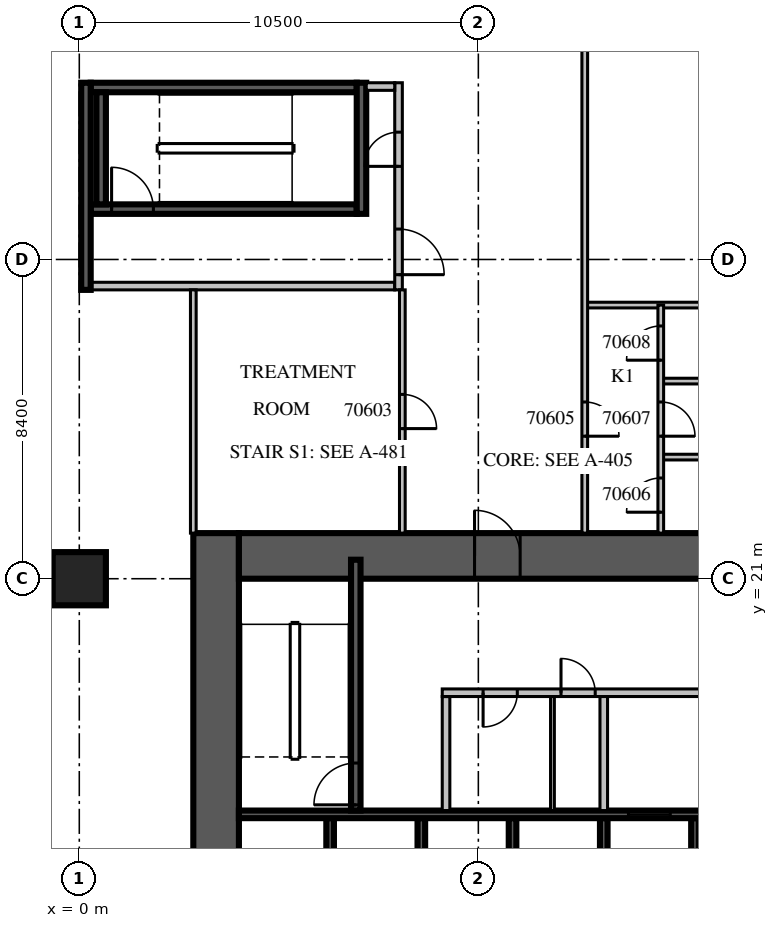
"""IFC4 building model, lengths in metres.
Left out: names, types, materials, properties, quantities, classifications, styles, units other than length and angle.
Written with IfcOpenShell. Run it as: python <this file> out.ifc"""

import sys

from ifc_helpers import new_model, si_unit, direction, frame, frame_2d, origin, origin_2d, place, context, subcontext, project, spatial, rectangle, extrude, source, transform, mapped, element, fill, save


model = new_model("IFC4")
c1 = context("Model", 3, precision=1e-05, world=origin(), true_north=direction((0.0, 1.0)))
c2 = subcontext(c1, "Body", "Model", "MODEL_VIEW")
j1 = project(units=[si_unit("LENGTHUNIT", "METRE"), si_unit("PLANEANGLEUNIT", "RADIAN")], contexts=[c1])
p1 = place(None, origin())
s1 = spatial("IfcSite", under=j1, at=p1, CompositionType="ELEMENT")
p2 = place(p1, origin())
s2 = spatial("IfcBuilding", under=s1, at=p2, CompositionType="ELEMENT")
p3 = place(p2, frame((0.0, 0.0, 18.3)))
s3 = spatial("IfcBuildingStorey", under=s2, at=p3, CompositionType="ELEMENT", Elevation=18.3)
m1 = source(origin(), c2, "Body", "SweptSolid", [
    extrude(rectangle(XDim=1.4, YDim=1.4, at=origin_2d()), origin(), (0.0, 0.0, 1.0), 5.4),
])
p4 = place(p3, frame((0.0, 21.0, 0.0), z_axis=(0.0, 0.0, 1.0), x_axis=(1.0, 0.0, 0.0)))
e1 = element("IfcColumn", 1, at=p4, inside=s3, PredefinedType="COLUMN", context=c2, shape_type="MappedRepresentation", body=[
    mapped(m1, transform((0.0, 0.0, 0.0), scale=1.0)),
])
m2 = source(origin(), c2, "Body", "SweptSolid", [
    extrude(rectangle(XDim=18.0, YDim=1.2, at=frame_2d((9.0, 0.0))), origin(), (0.0, 0.0, 1.0), 5.4),
])
p5 = place(p3, frame((3.6, 4.2, 0.0), z_axis=(0.0, 0.0, 1.0), x_axis=(0.0, 1.0, 0.0)))
e2 = element("IfcWall", 2, at=p5, inside=s3, PredefinedType="SHEAR", context=c2, shape_type="MappedRepresentation", body=[
    mapped(m2, transform((0.0, 0.0, 0.0), scale=1.0)),
])
m3 = source(origin(), c2, "Body", "SweptSolid", [
    extrude(rectangle(XDim=2.2, YDim=2.1, at=frame_2d((1.1, 1.05))), frame((0.0, 0.61, 0.0), z_axis=(0.0, -1.0, 0.0), x_axis=(1.0, 0.0, 0.0)), (0.0, 0.0, 1.0), 1.22),
])
p6 = place(p5, frame((4.6, 0.0, 0.0)))
e3 = element("IfcOpeningElement", 3, at=p6, cuts=e2, PredefinedType="OPENING", context=c2, shape_type="MappedRepresentation", body=[
    mapped(m3, transform((0.0, 0.0, 0.0), scale=1.0)),
])
m4 = source(origin(), c2, "Body", "SweptSolid", [
    extrude(rectangle(XDim=16.8, YDim=1.2, at=frame_2d((8.4, 0.0))), origin(), (0.0, 0.0, 1.0), 5.4),
])
p7 = place(p3, frame((4.2, 21.6, 0.0), z_axis=(0.0, 0.0, 1.0), x_axis=(1.0, 0.0, 0.0)))
e4 = element("IfcWall", 4, at=p7, inside=s3, PredefinedType="SHEAR", context=c2, shape_type="MappedRepresentation", body=[
    mapped(m4, transform((0.0, 0.0, 0.0), scale=1.0)),
])
m5 = source(origin(), c2, "Body", "SweptSolid", [
    extrude(rectangle(XDim=1.2, YDim=2.1, at=frame_2d((0.6, 1.05))), frame((0.0, 0.61, 0.0), z_axis=(0.0, -1.0, 0.0), x_axis=(1.0, 0.0, 0.0)), (0.0, 0.0, 1.0), 1.22),
])
p8 = place(p7, frame((6.2, 0.0, 0.0)))
e5 = element("IfcOpeningElement", 5, at=p8, cuts=e4, PredefinedType="OPENING", context=c2, shape_type="MappedRepresentation", body=[
    mapped(m5, transform((0.0, 0.0, 0.0), scale=1.0)),
])
m6 = source(origin(), c2, "Body", "SweptSolid", [
    extrude(rectangle(XDim=3.0, YDim=0.2, at=frame_2d((1.5, 0.0))), origin(), (0.0, 0.0, 1.0), 5.4),
])
for number, where, z_axis, x_axis in (
    (6, (6.6, 11.7, 0.0), (0.0, 0.0, 1.0), (0.0, 1.0, 0.0)),
    (7, (9.0, 11.7, 0.0), (0.0, 0.0, 1.0), (0.0, 1.0, 0.0)),
    (8, (11.4, 11.7, 0.0), (0.0, 0.0, 1.0), (0.0, 1.0, 0.0)),
    (9, (13.8, 11.7, 0.0), (0.0, 0.0, 1.0), (0.0, 1.0, 0.0)),
    (10, (16.2, 11.7, 0.0), (0.0, 0.0, 1.0), (0.0, 1.0, 0.0)),
):
    element("IfcWall", number, at=place(p3, frame(where, z_axis=z_axis, x_axis=x_axis)), inside=s3, PredefinedType="SOLIDWALL", context=c2, shape_type="MappedRepresentation", body=[
        mapped(m6, transform((0.0, 0.0, 0.0), scale=1.0)),
    ])
m7 = source(origin(), c2, "Body", "SweptSolid", [
    extrude(rectangle(XDim=16.8, YDim=0.2, at=frame_2d((8.4, 0.0))), origin(), (0.0, 0.0, 1.0), 5.4),
])
p9 = place(p3, frame((4.2, 14.8, 0.0), z_axis=(0.0, 0.0, 1.0), x_axis=(1.0, 0.0, 0.0)))
e11 = element("IfcWall", 11, at=p9, inside=s3, PredefinedType="SOLIDWALL", context=c2, shape_type="MappedRepresentation", body=[
    mapped(m7, transform((0.0, 0.0, 0.0), scale=1.0)),
])
m8 = source(origin(), c2, "Body", "SweptSolid", [
    extrude(rectangle(XDim=1.1, YDim=2.1, at=frame_2d((0.55, 1.05))), frame((0.0, 0.11, 0.0), z_axis=(0.0, -1.0, 0.0), x_axis=(1.0, 0.0, 0.0)), (0.0, 0.0, 1.0), 0.22),
])
p10 = place(p9, frame((10.25, 0.0, 0.0)))
e12 = element("IfcOpeningElement", 12, at=p10, cuts=e11, PredefinedType="OPENING", context=c2, shape_type="MappedRepresentation", body=[
    mapped(m8, transform((0.0, 0.0, 0.0), scale=1.0)),
])
p11 = place(p9, frame((12.65, 0.0, 0.0)))
e13 = element("IfcOpeningElement", 13, at=p11, cuts=e11, PredefinedType="OPENING", context=c2, shape_type="MappedRepresentation", body=[
    mapped(m8, transform((0.0, 0.0, 0.0), scale=1.0)),
])
p12 = place(p9, frame((15.05, 0.0, 0.0)))
e14 = element("IfcOpeningElement", 14, at=p12, cuts=e11, PredefinedType="OPENING", context=c2, shape_type="MappedRepresentation", body=[
    mapped(m8, transform((0.0, 0.0, 0.0), scale=1.0)),
])
m9 = source(origin(), c2, "Body", "SweptSolid", [
    extrude(rectangle(XDim=6.6, YDim=0.25, at=frame_2d((3.3, 0.0))), origin(), (0.0, 0.0, 1.0), 4.8),
])
p13 = place(p3, frame((7.275, 14.9, 0.0), z_axis=(0.0, 0.0, 1.0), x_axis=(0.0, 1.0, 0.0)))
e15 = element("IfcWall", 15, at=p13, inside=s3, PredefinedType="SOLIDWALL", context=c2, shape_type="MappedRepresentation", body=[
    mapped(m9, transform((0.0, 0.0, 0.0), scale=1.0)),
])
m10 = source(origin(), c2, "Body", "SweptSolid", [
    extrude(rectangle(XDim=1.1, YDim=2.1, at=frame_2d((0.55, 1.05))), frame((0.0, 0.135, 0.0), z_axis=(0.0, -1.0, 0.0), x_axis=(1.0, 0.0, 0.0)), (0.0, 0.0, 1.0), 0.27),
])
p14 = place(p13, frame((0.15, 0.0, 0.0)))
e16 = element("IfcOpeningElement", 16, at=p14, cuts=e15, PredefinedType="OPENING", context=c2, shape_type="MappedRepresentation", body=[
    mapped(m10, transform((0.0, 0.0, 0.0), scale=1.0)),
])
m11 = source(origin(), c2, "Body", "SweptSolid", [
    extrude(rectangle(XDim=3.0, YDim=0.2, at=frame_2d((1.5, 0.0))), origin(), (0.0, 0.0, 1.0), 4.8),
])
p15 = place(p3, frame((9.65, 14.9, 0.0), z_axis=(0.0, 0.0, 1.0), x_axis=(0.0, 1.0, 0.0)))
e17 = element("IfcWall", 17, at=p15, inside=s3, PredefinedType="PARTITIONING", context=c2, shape_type="MappedRepresentation", body=[
    mapped(m11, transform((0.0, 0.0, 0.0), scale=1.0)),
])
m12 = source(origin(), c2, "Body", "SweptSolid", [
    extrude(rectangle(XDim=11.45, YDim=0.2, at=frame_2d((5.725, 0.0))), origin(), (0.0, 0.0, 1.0), 4.8),
])
p16 = place(p3, frame((9.55, 18.0, 0.0), z_axis=(0.0, 0.0, 1.0), x_axis=(1.0, 0.0, 0.0)))
e18 = element("IfcWall", 18, at=p16, inside=s3, PredefinedType="PARTITIONING", context=c2, shape_type="MappedRepresentation", body=[
    mapped(m12, transform((0.0, 0.0, 0.0), scale=1.0)),
])
m13 = source(origin(), c2, "Body", "SweptSolid", [
    extrude(rectangle(XDim=0.9, YDim=2.1, at=frame_2d((0.45, 1.05))), frame((0.0, 0.11, 0.0), z_axis=(0.0, -1.0, 0.0), x_axis=(1.0, 0.0, 0.0)), (0.0, 0.0, 1.0), 0.22),
])
p17 = place(p16, frame((1.075, 0.0, 0.0)))
e19 = element("IfcOpeningElement", 19, at=p17, cuts=e18, PredefinedType="OPENING", context=c2, shape_type="MappedRepresentation", body=[
    mapped(m13, transform((0.0, 0.0, 0.0), scale=1.0)),
])
p18 = place(p16, frame((3.125, 0.0, 0.0)))
e20 = element("IfcOpeningElement", 20, at=p18, cuts=e18, PredefinedType="OPENING", context=c2, shape_type="MappedRepresentation", body=[
    mapped(m13, transform((0.0, 0.0, 0.0), scale=1.0)),
])
p19 = place(p16, frame((7.35, 0.0, 0.0)))
e21 = element("IfcOpeningElement", 21, at=p19, cuts=e18, PredefinedType="OPENING", context=c2, shape_type="MappedRepresentation", body=[
    mapped(m8, transform((0.0, 0.0, 0.0), scale=1.0)),
])
p20 = place(p3, frame((13.8, 14.9, 0.0), z_axis=(0.0, 0.0, 1.0), x_axis=(0.0, 1.0, 0.0)))
e22 = element("IfcWall", 22, at=p20, inside=s3, PredefinedType="PARTITIONING", context=c2, shape_type="MappedRepresentation", body=[
    mapped(m11, transform((0.0, 0.0, 0.0), scale=1.0)),
])
m14 = source(origin(), c2, "Body", "SweptSolid", [
    extrude(rectangle(XDim=3.0, YDim=0.1, at=frame_2d((1.5, 0.0))), origin(), (0.0, 0.0, 1.0), 4.8),
])
p21 = place(p3, frame((12.45, 14.9, 0.0), z_axis=(0.0, 0.0, 1.0), x_axis=(0.0, 1.0, 0.0)))
e23 = element("IfcWall", 23, at=p21, inside=s3, PredefinedType="PARTITIONING", context=c2, shape_type="MappedRepresentation", body=[
    mapped(m14, transform((0.0, 0.0, 0.0), scale=1.0)),
])
m15 = source(origin(), c2, "Body", "SweptSolid", [
    extrude(rectangle(XDim=7.0, YDim=0.25, at=frame_2d((3.5, 0.0))), origin(), (0.0, 0.0, 1.0), 4.8),
])
p22 = place(p3, frame((0.3, 30.725, 0.0), z_axis=(0.0, 0.0, 1.0), x_axis=(1.0, 0.0, 0.0)))
e24 = element("IfcWall", 24, at=p22, inside=s3, PredefinedType="SOLIDWALL", context=c2, shape_type="MappedRepresentation", body=[
    mapped(m15, transform((0.0, 0.0, 0.0), scale=1.0)),
])
p23 = place(p22, frame((0.55, 0.0, 0.0)))
e25 = element("IfcOpeningElement", 25, at=p23, cuts=e24, PredefinedType="OPENING", context=c2, shape_type="MappedRepresentation", body=[
    mapped(m10, transform((0.0, 0.0, 0.0), scale=1.0)),
])
p24 = place(p3, frame((0.3, 33.925, 0.0), z_axis=(0.0, 0.0, 1.0), x_axis=(1.0, 0.0, 0.0)))
e26 = element("IfcWall", 26, at=p24, inside=s3, PredefinedType="SOLIDWALL", context=c2, shape_type="MappedRepresentation", body=[
    mapped(m15, transform((0.0, 0.0, 0.0), scale=1.0)),
])
m16 = source(origin(), c2, "Body", "SweptSolid", [
    extrude(rectangle(XDim=3.45, YDim=0.25, at=frame_2d((1.725, 0.0))), origin(), (0.0, 0.0, 1.0), 4.8),
])
p25 = place(p3, frame((7.425, 30.6, 0.0), z_axis=(0.0, 0.0, 1.0), x_axis=(0.0, 1.0, 0.0)))
e27 = element("IfcWall", 27, at=p25, inside=s3, PredefinedType="SOLIDWALL", context=c2, shape_type="MappedRepresentation", body=[
    mapped(m16, transform((0.0, 0.0, 0.0), scale=1.0)),
])
m17 = source(origin(), c2, "Body", "SweptSolid", [
    extrude(rectangle(XDim=2.95, YDim=0.25, at=frame_2d((1.475, 0.0))), origin(), (0.0, 0.0, 1.0), 4.8),
])
p26 = place(p3, frame((0.575, 30.85, 0.0), z_axis=(0.0, 0.0, 1.0), x_axis=(0.0, 1.0, 0.0)))
e28 = element("IfcWall", 28, at=p26, inside=s3, PredefinedType="SOLIDWALL", context=c2, shape_type="MappedRepresentation", body=[
    mapped(m17, transform((0.0, 0.0, 0.0), scale=1.0)),
])
m18 = source(origin(), c2, "Body", "SweptSolid", [
    extrude(rectangle(XDim=8.0, YDim=0.2, at=frame_2d((4.0, 0.0))), origin(), (0.0, 0.0, 1.0), 4.8),
])
p27 = place(p3, frame((0.3, 28.7, 0.0), z_axis=(0.0, 0.0, 1.0), x_axis=(1.0, 0.0, 0.0)))
e29 = element("IfcWall", 29, at=p27, inside=s3, PredefinedType="PARTITIONING", context=c2, shape_type="MappedRepresentation", body=[
    mapped(m18, transform((0.0, 0.0, 0.0), scale=1.0)),
])
m19 = source(origin(), c2, "Body", "SweptSolid", [
    extrude(rectangle(XDim=5.45, YDim=0.2, at=frame_2d((2.725, 0.0))), origin(), (0.0, 0.0, 1.0), 4.8),
])
p28 = place(p3, frame((8.4, 28.6, 0.0), z_axis=(0.0, 0.0, 1.0), x_axis=(0.0, 1.0, 0.0)))
e30 = element("IfcWall", 30, at=p28, inside=s3, PredefinedType="PARTITIONING", context=c2, shape_type="MappedRepresentation", body=[
    mapped(m19, transform((0.0, 0.0, 0.0), scale=1.0)),
])
m20 = source(origin(), c2, "Body", "SweptSolid", [
    extrude(rectangle(XDim=1.2, YDim=2.1, at=frame_2d((0.6, 1.05))), frame((0.0, 0.11, 0.0), z_axis=(0.0, -1.0, 0.0), x_axis=(1.0, 0.0, 0.0)), (0.0, 0.0, 1.0), 0.22),
])
p29 = place(p28, frame((0.4, 0.0, 0.0)))
e31 = element("IfcOpeningElement", 31, at=p29, cuts=e30, PredefinedType="OPENING", context=c2, shape_type="MappedRepresentation", body=[
    mapped(m20, transform((0.0, 0.0, 0.0), scale=1.0)),
])
p30 = place(p28, frame((3.25, 0.0, 0.0)))
e32 = element("IfcOpeningElement", 32, at=p30, cuts=e30, PredefinedType="OPENING", context=c2, shape_type="MappedRepresentation", body=[
    mapped(m13, transform((0.0, 0.0, 0.0), scale=1.0)),
])
m21 = source(origin(), c2, "Body", "SweptSolid", [
    extrude(rectangle(XDim=0.75, YDim=0.2, at=frame_2d((0.375, 0.0))), origin(), (0.0, 0.0, 1.0), 4.8),
])
p31 = place(p3, frame((7.55, 33.95, 0.0), z_axis=(0.0, 0.0, 1.0), x_axis=(1.0, 0.0, 0.0)))
e33 = element("IfcWall", 33, at=p31, inside=s3, PredefinedType="PARTITIONING", context=c2, shape_type="MappedRepresentation", body=[
    mapped(m21, transform((0.0, 0.0, 0.0), scale=1.0)),
])
m22 = source(origin(), c2, "Body", "SweptSolid", [
    extrude(rectangle(XDim=5.45, YDim=0.25, at=frame_2d((2.725, 0.0))), origin(), (0.0, 0.0, 1.0), 4.8),
])
p32 = place(p3, frame((0.175, 28.6, 0.0), z_axis=(0.0, 0.0, 1.0), x_axis=(0.0, 1.0, 0.0)))
e34 = element("IfcWall", 34, at=p32, inside=s3, PredefinedType="SOLIDWALL", context=c2, shape_type="MappedRepresentation", body=[
    mapped(m22, transform((0.0, 0.0, 0.0), scale=1.0)),
])
m23 = source(origin(), c2, "Body", "SweptSolid", [
    extrude(rectangle(XDim=8.0, YDim=0.15, at=frame_2d((4.0, 0.0))), origin(), (0.0, 0.0, 1.0), 4.8),
])
for number, where, z_axis, x_axis in (
    (35, (15.3, 24.2, 0.0), (0.0, 0.0, 1.0), (1.0, 0.0, 0.0)),
    (36, (15.3, 26.2, 0.0), (0.0, 0.0, 1.0), (1.0, 0.0, 0.0)),
):
    element("IfcWall", number, at=place(p3, frame(where, z_axis=z_axis, x_axis=x_axis)), inside=s3, PredefinedType="PARTITIONING", context=c2, shape_type="MappedRepresentation", body=[
        mapped(m23, transform((0.0, 0.0, 0.0), scale=1.0)),
    ])
m24 = source(origin(), c2, "Body", "SweptSolid", [
    extrude(rectangle(XDim=10.0, YDim=0.15, at=frame_2d((5.0, 0.0))), origin(), (0.0, 0.0, 1.0), 4.8),
])
p33 = place(p3, frame((13.3, 28.2, 0.0), z_axis=(0.0, 0.0, 1.0), x_axis=(1.0, 0.0, 0.0)))
e37 = element("IfcWall", 37, at=p33, inside=s3, PredefinedType="PARTITIONING", context=c2, shape_type="MappedRepresentation", body=[
    mapped(m24, transform((0.0, 0.0, 0.0), scale=1.0)),
])
m25 = source(origin(), c2, "Body", "SweptSolid", [
    extrude(rectangle(XDim=6.4, YDim=0.15, at=frame_2d((3.2, 0.0))), origin(), (0.0, 0.0, 1.0), 4.8),
])
p34 = place(p3, frame((3.0, 22.2, 0.0), z_axis=(0.0, 0.0, 1.0), x_axis=(0.0, 1.0, 0.0)))
e38 = element("IfcWall", 38, at=p34, inside=s3, PredefinedType="PARTITIONING", context=c2, shape_type="MappedRepresentation", body=[
    mapped(m25, transform((0.0, 0.0, 0.0), scale=1.0)),
])
p35 = place(p3, frame((8.5, 22.2, 0.0), z_axis=(0.0, 0.0, 1.0), x_axis=(0.0, 1.0, 0.0)))
e39 = element("IfcWall", 39, at=p35, inside=s3, PredefinedType="PARTITIONING", context=c2, shape_type="MappedRepresentation", body=[
    mapped(m25, transform((0.0, 0.0, 0.0), scale=1.0)),
])
m26 = source(origin(), c2, "Body", "SweptSolid", [
    extrude(rectangle(XDim=0.9, YDim=2.1, at=frame_2d((0.45, 1.05))), frame((0.0, 0.085, 0.0), z_axis=(0.0, -1.0, 0.0), x_axis=(1.0, 0.0, 0.0)), (0.0, 0.0, 1.0), 0.17),
])
p36 = place(p35, frame((2.75, 0.0, 0.0)))
e40 = element("IfcOpeningElement", 40, at=p36, cuts=e39, PredefinedType="OPENING", context=c2, shape_type="MappedRepresentation", body=[
    mapped(m26, transform((0.0, 0.0, 0.0), scale=1.0)),
])
m27 = source(origin(), c2, "Body", "SweptSolid", [
    extrude(rectangle(XDim=20.3, YDim=0.15, at=frame_2d((10.15, 0.0))), origin(), (0.0, 0.0, 1.0), 4.8),
])
p37 = place(p3, frame((13.3, 22.2, 0.0), z_axis=(0.0, 0.0, 1.0), x_axis=(0.0, 1.0, 0.0)))
e41 = element("IfcWall", 41, at=p37, inside=s3, PredefinedType="PARTITIONING", context=c2, shape_type="MappedRepresentation", body=[
    mapped(m27, transform((0.0, 0.0, 0.0), scale=1.0)),
])
p38 = place(p37, frame((2.55, 0.0, 0.0)))
e42 = element("IfcOpeningElement", 42, at=p38, cuts=e41, PredefinedType="OPENING", context=c2, shape_type="MappedRepresentation", body=[
    mapped(m26, transform((0.0, 0.0, 0.0), scale=1.0)),
])
m28 = source(origin(), c2, "Body", "SweptSolid", [
    extrude(rectangle(XDim=6.0, YDim=0.15, at=frame_2d((3.0, 0.0))), origin(), (0.0, 0.0, 1.0), 4.8),
])
p39 = place(p3, frame((15.3, 22.2, 0.0), z_axis=(0.0, 0.0, 1.0), x_axis=(0.0, 1.0, 0.0)))
e43 = element("IfcWall", 43, at=p39, inside=s3, PredefinedType="PARTITIONING", context=c2, shape_type="MappedRepresentation", body=[
    mapped(m28, transform((0.0, 0.0, 0.0), scale=1.0)),
])
p40 = place(p39, frame((0.55, 0.0, 0.0)))
e44 = element("IfcOpeningElement", 44, at=p40, cuts=e43, PredefinedType="OPENING", context=c2, shape_type="MappedRepresentation", body=[
    mapped(m26, transform((0.0, 0.0, 0.0), scale=1.0)),
])
p41 = place(p39, frame((2.55, 0.0, 0.0)))
e45 = element("IfcOpeningElement", 45, at=p41, cuts=e43, PredefinedType="OPENING", context=c2, shape_type="MappedRepresentation", body=[
    mapped(m26, transform((0.0, 0.0, 0.0), scale=1.0)),
])
p42 = place(p39, frame((4.55, 0.0, 0.0)))
e46 = element("IfcOpeningElement", 46, at=p42, cuts=e43, PredefinedType="OPENING", context=c2, shape_type="MappedRepresentation", body=[
    mapped(m26, transform((0.0, 0.0, 0.0), scale=1.0)),
])
m29 = source(origin(), c2, "Body", "SweptSolid", [
    extrude(rectangle(XDim=1.1, YDim=2.1, at=frame_2d((0.55, 1.05))), frame((0.0, 0.025, 0.0), z_axis=(0.0, -1.0, 0.0), x_axis=(1.0, 0.0, 0.0)), (0.0, 0.0, 1.0), 0.05),
])
p43 = place(p10, origin())
e47 = element("IfcDoor", 47, at=p43, inside=s3, OperationType="SLIDING_TO_LEFT", PredefinedType="DOOR", context=c2, shape_type="MappedRepresentation", body=[
    mapped(m29, transform((0.0, 0.0, 0.0), scale=1.0)),
])
fill(e12, e47)
p44 = place(p14, origin())
e48 = element("IfcDoor", 48, at=p44, inside=s3, OperationType="SINGLE_SWING_LEFT", PredefinedType="DOOR", context=c2, shape_type="MappedRepresentation", body=[
    mapped(m29, transform((0.0, 0.0, 0.0), scale=1.0)),
])
fill(e16, e48)
m30 = source(origin(), c2, "Body", "SweptSolid", [
    extrude(rectangle(XDim=0.9, YDim=2.1, at=frame_2d((0.45, 1.05))), frame((0.0, 0.025, 0.0), z_axis=(0.0, -1.0, 0.0), x_axis=(1.0, 0.0, 0.0)), (0.0, 0.0, 1.0), 0.05),
])
p45 = place(p17, origin())
e49 = element("IfcDoor", 49, at=p45, inside=s3, OperationType="SINGLE_SWING_RIGHT", PredefinedType="DOOR", context=c2, shape_type="MappedRepresentation", body=[
    mapped(m30, transform((0.0, 0.0, 0.0), scale=1.0)),
])
fill(e19, e49)
p46 = place(p18, origin())
e50 = element("IfcDoor", 50, at=p46, inside=s3, OperationType="SINGLE_SWING_LEFT", PredefinedType="DOOR", context=c2, shape_type="MappedRepresentation", body=[
    mapped(m30, transform((0.0, 0.0, 0.0), scale=1.0)),
])
fill(e20, e50)
p47 = place(p23, origin())
e51 = element("IfcDoor", 51, at=p47, inside=s3, OperationType="SINGLE_SWING_LEFT", PredefinedType="DOOR", context=c2, shape_type="MappedRepresentation", body=[
    mapped(m29, transform((0.0, 0.0, 0.0), scale=1.0)),
])
fill(e25, e51)
m31 = source(origin(), c2, "Body", "SweptSolid", [
    extrude(rectangle(XDim=1.2, YDim=2.1, at=frame_2d((0.6, 1.05))), frame((0.0, 0.025, 0.0), z_axis=(0.0, -1.0, 0.0), x_axis=(1.0, 0.0, 0.0)), (0.0, 0.0, 1.0), 0.05),
])
p48 = place(p29, origin())
e52 = element("IfcDoor", 52, at=p48, inside=s3, OperationType="SINGLE_SWING_RIGHT", PredefinedType="DOOR", context=c2, shape_type="MappedRepresentation", body=[
    mapped(m31, transform((0.0, 0.0, 0.0), scale=1.0)),
])
fill(e31, e52)
p49 = place(p30, origin())
e53 = element("IfcDoor", 53, at=p49, inside=s3, OperationType="SINGLE_SWING_LEFT", PredefinedType="DOOR", context=c2, shape_type="MappedRepresentation", body=[
    mapped(m30, transform((0.0, 0.0, 0.0), scale=1.0)),
])
fill(e32, e53)
p50 = place(p8, origin())
e54 = element("IfcDoor", 54, at=p50, inside=s3, OperationType="SINGLE_SWING_LEFT", PredefinedType="DOOR", context=c2, shape_type="MappedRepresentation", body=[
    mapped(m31, transform((0.0, 0.0, 0.0), scale=1.0)),
])
fill(e5, e54)
p51 = place(p36, origin())
e55 = element("IfcDoor", 55, at=p51, inside=s3, OperationType="SINGLE_SWING_RIGHT", PredefinedType="DOOR", context=c2, shape_type="MappedRepresentation", body=[
    mapped(m30, transform((0.0, 0.0, 0.0), scale=1.0)),
])
fill(e40, e55)
p52 = place(p38, origin())
e56 = element("IfcDoor", 56, at=p52, inside=s3, OperationType="SINGLE_SWING_RIGHT", PredefinedType="DOOR", context=c2, shape_type="MappedRepresentation", body=[
    mapped(m30, transform((0.0, 0.0, 0.0), scale=1.0)),
])
fill(e42, e56)
p53 = place(p40, origin())
e57 = element("IfcDoor", 57, at=p53, inside=s3, OperationType="SINGLE_SWING_LEFT", PredefinedType="DOOR", context=c2, shape_type="MappedRepresentation", body=[
    mapped(m30, transform((0.0, 0.0, 0.0), scale=1.0)),
])
fill(e44, e57)
p54 = place(p41, origin())
e58 = element("IfcDoor", 58, at=p54, inside=s3, OperationType="SINGLE_SWING_RIGHT", PredefinedType="DOOR", context=c2, shape_type="MappedRepresentation", body=[
    mapped(m30, transform((0.0, 0.0, 0.0), scale=1.0)),
])
fill(e45, e58)
p55 = place(p42, origin())
e59 = element("IfcDoor", 59, at=p55, inside=s3, OperationType="SINGLE_SWING_LEFT", PredefinedType="DOOR", context=c2, shape_type="MappedRepresentation", body=[
    mapped(m30, transform((0.0, 0.0, 0.0), scale=1.0)),
])
fill(e46, e59)
save(model, sys.argv[1])
